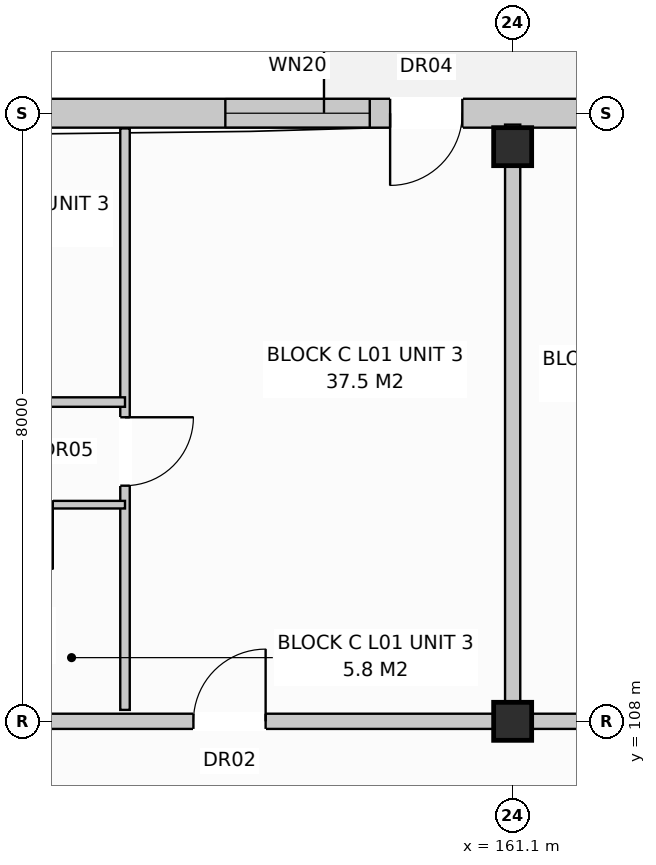
"""IFC4 building model, lengths in metres.
Left out: names, types, materials, properties, quantities, classifications, styles, units other than length and angle.
Written with IfcOpenShell. Run it as: python <this file> out.ifc"""

import sys

from ifc_helpers import new_model, si_unit, direction, frame, frame_2d, origin, origin_with_axes, origin_2d, place, context, subcontext, project, spatial, rectangle, extrude, element, fill, save


model = new_model("IFC4")
c1 = context("Model", 3, precision=1e-05, world=origin(), true_north=direction((0.0, 1.0)))
c2 = subcontext(c1, "Body", "Model", "MODEL_VIEW")
j1 = project(units=[si_unit("LENGTHUNIT", "METRE"), si_unit("PLANEANGLEUNIT", "RADIAN")], contexts=[c1])
p1 = place(None, origin())
s1 = spatial("IfcSite", under=j1, at=p1, CompositionType="ELEMENT")
p2 = place(p1, origin())
s2 = spatial("IfcBuilding", under=s1, at=p2, CompositionType="ELEMENT")
p3 = place(p2, frame((0.0, 0.0, 4.4)))
s3 = spatial("IfcBuildingStorey", under=s2, at=p3, CompositionType="ELEMENT", Elevation=4.4)
for number, where, z_axis, x_axis in (
    (1, (161.1, 108.0, 0.0), (0.0, 0.0, 1.0), (1.0, 0.0, 0.0)),
    (2, (161.1, 115.56, 0.0), (0.0, 0.0, 1.0), (1.0, 0.0, 0.0)),
):
    element("IfcColumn", number, at=place(p3, frame(where, z_axis=z_axis, x_axis=x_axis)), inside=s3, PredefinedType="COLUMN", context=c2, shape_type="SweptSolid", body=[
        extrude(rectangle(XDim=0.5, YDim=0.5, at=origin_2d()), origin(), (0.0, 0.0, 1.0), 3.6),
    ])
p4 = place(p3, frame((112.98, 116.0, 0.0), z_axis=(0.0, 0.0, 1.0), x_axis=(1.0, 0.0, 0.0)))
e3 = element("IfcWall", 3, at=p4, inside=s3, PredefinedType="STANDARD", context=c2, shape_type="SweptSolid", body=[
    extrude(rectangle(XDim=54.84, YDim=0.38, at=frame_2d((27.42, 0.0))), origin(), (0.0, 0.0, 1.0), 3.33),
])
p5 = place(p4, frame((7.39, 0.0, 0.0)))
e4 = element("IfcOpeningElement", 4, at=p5, cuts=e3, PredefinedType="OPENING", context=c2, shape_type="SweptSolid", body=[
    extrude(rectangle(XDim=0.95, YDim=2.1, at=frame_2d((0.475, 1.05))), frame((0.0, 0.202, 0.0), z_axis=(0.0, -1.0, 0.0), x_axis=(1.0, 0.0, 0.0)), (0.0, 0.0, 1.0), 0.404),
])
p6 = place(p4, frame((18.708, 0.0, 0.0)))
e5 = element("IfcOpeningElement", 5, at=p6, cuts=e3, PredefinedType="OPENING", context=c2, shape_type="SweptSolid", body=[
    extrude(rectangle(XDim=0.95, YDim=2.1, at=frame_2d((0.475, 1.05))), frame((0.0, 0.202, 0.0), z_axis=(0.0, -1.0, 0.0), x_axis=(1.0, 0.0, 0.0)), (0.0, 0.0, 1.0), 0.404),
])
p7 = place(p4, frame((32.708, 0.0, 0.0)))
e6 = element("IfcOpeningElement", 6, at=p7, cuts=e3, PredefinedType="OPENING", context=c2, shape_type="SweptSolid", body=[
    extrude(rectangle(XDim=0.95, YDim=2.1, at=frame_2d((0.475, 1.05))), frame((0.0, 0.202, 0.0), z_axis=(0.0, -1.0, 0.0), x_axis=(1.0, 0.0, 0.0)), (0.0, 0.0, 1.0), 0.404),
])
p8 = place(p4, frame((46.508, 0.0, 0.0)))
e7 = element("IfcOpeningElement", 7, at=p8, cuts=e3, PredefinedType="OPENING", context=c2, shape_type="SweptSolid", body=[
    extrude(rectangle(XDim=0.95, YDim=2.1, at=frame_2d((0.475, 1.05))), frame((0.0, 0.202, 0.0), z_axis=(0.0, -1.0, 0.0), x_axis=(1.0, 0.0, 0.0)), (0.0, 0.0, 1.0), 0.404),
])
p9 = place(p4, frame((1.515, 0.0, 0.8)))
e8 = element("IfcOpeningElement", 8, at=p9, cuts=e3, PredefinedType="OPENING", context=c2, shape_type="SweptSolid", body=[
    extrude(rectangle(XDim=1.95, YDim=1.65, at=frame_2d((0.975, 0.825))), frame((0.0, 0.202, 0.0), z_axis=(0.0, -1.0, 0.0), x_axis=(1.0, 0.0, 0.0)), (0.0, 0.0, 1.0), 0.404),
])
p10 = place(p4, frame((10.49, 0.0, 0.8)))
e9 = element("IfcOpeningElement", 9, at=p10, cuts=e3, PredefinedType="OPENING", context=c2, shape_type="SweptSolid", body=[
    extrude(rectangle(XDim=1.8, YDim=1.7, at=frame_2d((0.9, 0.85))), frame((0.0, 0.202, 0.0), z_axis=(0.0, -1.0, 0.0), x_axis=(1.0, 0.0, 0.0)), (0.0, 0.0, 1.0), 0.404),
])
p11 = place(p4, frame((15.84, 0.0, 0.8)))
e10 = element("IfcOpeningElement", 10, at=p11, cuts=e3, PredefinedType="OPENING", context=c2, shape_type="SweptSolid", body=[
    extrude(rectangle(XDim=1.9, YDim=1.85, at=frame_2d((0.95, 0.925))), frame((0.0, 0.202, 0.0), z_axis=(0.0, -1.0, 0.0), x_axis=(1.0, 0.0, 0.0)), (0.0, 0.0, 1.0), 0.404),
])
p12 = place(p4, frame((21.515, 0.0, 0.8)))
e11 = element("IfcOpeningElement", 11, at=p12, cuts=e3, PredefinedType="OPENING", context=c2, shape_type="SweptSolid", body=[
    extrude(rectangle(XDim=1.95, YDim=1.65, at=frame_2d((0.975, 0.825))), frame((0.0, 0.202, 0.0), z_axis=(0.0, -1.0, 0.0), x_axis=(1.0, 0.0, 0.0)), (0.0, 0.0, 1.0), 0.404),
])
p13 = place(p4, frame((27.99, 0.0, 0.8)))
e12 = element("IfcOpeningElement", 12, at=p13, cuts=e3, PredefinedType="OPENING", context=c2, shape_type="SweptSolid", body=[
    extrude(rectangle(XDim=1.8, YDim=1.7, at=frame_2d((0.9, 0.85))), frame((0.0, 0.202, 0.0), z_axis=(0.0, -1.0, 0.0), x_axis=(1.0, 0.0, 0.0)), (0.0, 0.0, 1.0), 0.404),
])
p14 = place(p4, frame((30.54, 0.0, 0.8)))
e13 = element("IfcOpeningElement", 13, at=p14, cuts=e3, PredefinedType="OPENING", context=c2, shape_type="SweptSolid", body=[
    extrude(rectangle(XDim=1.9, YDim=1.85, at=frame_2d((0.95, 0.925))), frame((0.0, 0.202, 0.0), z_axis=(0.0, -1.0, 0.0), x_axis=(1.0, 0.0, 0.0)), (0.0, 0.0, 1.0), 0.404),
])
p15 = place(p4, frame((35.515, 0.0, 0.8)))
e14 = element("IfcOpeningElement", 14, at=p15, cuts=e3, PredefinedType="OPENING", context=c2, shape_type="SweptSolid", body=[
    extrude(rectangle(XDim=1.95, YDim=1.65, at=frame_2d((0.975, 0.825))), frame((0.0, 0.202, 0.0), z_axis=(0.0, -1.0, 0.0), x_axis=(1.0, 0.0, 0.0)), (0.0, 0.0, 1.0), 0.404),
])
p16 = place(p4, frame((38.89, 0.0, 0.8)))
e15 = element("IfcOpeningElement", 15, at=p16, cuts=e3, PredefinedType="OPENING", context=c2, shape_type="SweptSolid", body=[
    extrude(rectangle(XDim=1.8, YDim=1.7, at=frame_2d((0.9, 0.85))), frame((0.0, 0.202, 0.0), z_axis=(0.0, -1.0, 0.0), x_axis=(1.0, 0.0, 0.0)), (0.0, 0.0, 1.0), 0.404),
])
p17 = place(p4, frame((44.34, 0.0, 0.8)))
e16 = element("IfcOpeningElement", 16, at=p17, cuts=e3, PredefinedType="OPENING", context=c2, shape_type="SweptSolid", body=[
    extrude(rectangle(XDim=1.9, YDim=1.85, at=frame_2d((0.95, 0.925))), frame((0.0, 0.202, 0.0), z_axis=(0.0, -1.0, 0.0), x_axis=(1.0, 0.0, 0.0)), (0.0, 0.0, 1.0), 0.404),
])
p18 = place(p4, frame((49.115, 0.0, 0.8)))
e17 = element("IfcOpeningElement", 17, at=p18, cuts=e3, PredefinedType="OPENING", context=c2, shape_type="SweptSolid", body=[
    extrude(rectangle(XDim=1.95, YDim=1.65, at=frame_2d((0.975, 0.825))), frame((0.0, 0.202, 0.0), z_axis=(0.0, -1.0, 0.0), x_axis=(1.0, 0.0, 0.0)), (0.0, 0.0, 1.0), 0.404),
])
p19 = place(p4, frame((52.405, 0.0, 0.8)))
e18 = element("IfcOpeningElement", 18, at=p19, cuts=e3, PredefinedType="OPENING", context=c2, shape_type="SweptSolid", body=[
    extrude(rectangle(XDim=1.8, YDim=1.7, at=frame_2d((0.9, 0.85))), frame((0.0, 0.202, 0.0), z_axis=(0.0, -1.0, 0.0), x_axis=(1.0, 0.0, 0.0)), (0.0, 0.0, 1.0), 0.404),
])
p20 = place(p3, frame((161.1, 108.15, 0.0), z_axis=(0.0, 0.0, 1.0), x_axis=(0.0, 1.0, 0.0)))
e19 = element("IfcWall", 19, at=p20, inside=s3, PredefinedType="PARTITIONING", context=c2, shape_type="SweptSolid", body=[
    extrude(rectangle(XDim=7.7, YDim=0.2, at=frame_2d((3.85, 0.0))), origin(), (0.0, 0.0, 1.0), 2.77),
])
p21 = place(p3, frame((147.3, 108.0, 0.0), z_axis=(0.0, 0.0, 1.0), x_axis=(1.0, 0.0, 0.0)))
e20 = element("IfcWall", 20, at=p21, inside=s3, PredefinedType="PARTITIONING", context=c2, shape_type="SweptSolid", body=[
    extrude(rectangle(XDim=13.8, YDim=0.2, at=frame_2d((6.9, 0.0))), origin(), (0.0, 0.0, 1.0), 2.77),
])
p22 = place(p21, frame((9.6, 0.0, 0.0)))
e21 = element("IfcOpeningElement", 21, at=p22, cuts=e20, PredefinedType="OPENING", context=c2, shape_type="SweptSolid", body=[
    extrude(rectangle(XDim=0.95, YDim=2.15, at=frame_2d((0.475, 1.075))), frame((0.0, 0.112, 0.0), z_axis=(0.0, -1.0, 0.0), x_axis=(1.0, 0.0, 0.0)), (0.0, 0.0, 1.0), 0.224),
])
p23 = place(p3, frame((156.0, 108.15, 0.0), z_axis=(0.0, 0.0, 1.0), x_axis=(0.0, 1.0, 0.0)))
e22 = element("IfcWall", 22, at=p23, inside=s3, PredefinedType="PARTITIONING", context=c2, shape_type="SweptSolid", body=[
    extrude(rectangle(XDim=7.65, YDim=0.125, at=frame_2d((3.825, 0.0))), origin(), (0.0, 0.0, 1.0), 3.33),
])
p24 = place(p23, frame((2.95, 0.0, 0.0)))
e23 = element("IfcOpeningElement", 23, at=p24, cuts=e22, PredefinedType="OPENING", context=c2, shape_type="SweptSolid", body=[
    extrude(rectangle(XDim=0.9, YDim=2.1, at=frame_2d((0.45, 1.05))), frame((0.0, 0.074, 0.0), z_axis=(0.0, -1.0, 0.0), x_axis=(1.0, 0.0, 0.0)), (0.0, 0.0, 1.0), 0.149),
])
p25 = place(p3, frame((147.4, 110.85, 0.0), z_axis=(0.0, 0.0, 1.0), x_axis=(1.0, 0.0, 0.0)))
e24 = element("IfcWall", 24, at=p25, inside=s3, PredefinedType="PARTITIONING", context=c2, shape_type="SweptSolid", body=[
    extrude(rectangle(XDim=8.6, YDim=0.1, at=frame_2d((4.3, 0.0))), origin(), (0.0, 0.0, 1.0), 3.33),
])
p26 = place(p25, frame((1.4, 0.0, 0.0)))
e25 = element("IfcOpeningElement", 25, at=p26, cuts=e24, PredefinedType="OPENING", context=c2, shape_type="SweptSolid", body=[
    extrude(rectangle(XDim=0.85, YDim=2.05, at=frame_2d((0.425, 1.025))), frame((0.0, 0.062, 0.0), z_axis=(0.0, -1.0, 0.0), x_axis=(1.0, 0.0, 0.0)), (0.0, 0.0, 1.0), 0.124),
])
p27 = place(p25, frame((4.65, 0.0, 0.0)))
e26 = element("IfcOpeningElement", 26, at=p27, cuts=e24, PredefinedType="OPENING", context=c2, shape_type="SweptSolid", body=[
    extrude(rectangle(XDim=0.85, YDim=2.05, at=frame_2d((0.425, 1.025))), frame((0.0, 0.062, 0.0), z_axis=(0.0, -1.0, 0.0), x_axis=(1.0, 0.0, 0.0)), (0.0, 0.0, 1.0), 0.124),
])
p28 = place(p25, frame((6.8, 0.0, 0.0)))
e27 = element("IfcOpeningElement", 27, at=p28, cuts=e24, PredefinedType="OPENING", context=c2, shape_type="SweptSolid", body=[
    extrude(rectangle(XDim=0.85, YDim=2.1, at=frame_2d((0.425, 1.05))), frame((0.0, 0.062, 0.0), z_axis=(0.0, -1.0, 0.0), x_axis=(1.0, 0.0, 0.0)), (0.0, 0.0, 1.0), 0.124),
])
p29 = place(p3, frame((151.5, 112.2, 0.0), z_axis=(0.0, 0.0, 1.0), x_axis=(1.0, 0.0, 0.0)))
e28 = element("IfcWall", 28, at=p29, inside=s3, PredefinedType="PARTITIONING", context=c2, shape_type="SweptSolid", body=[
    extrude(rectangle(XDim=4.5, YDim=0.125, at=frame_2d((2.25, 0.0))), origin(), (0.0, 0.0, 1.0), 3.33),
])
p30 = place(p29, frame((1.6, 0.0, 0.0)))
e29 = element("IfcOpeningElement", 29, at=p30, cuts=e28, PredefinedType="OPENING", context=c2, shape_type="SweptSolid", body=[
    extrude(rectangle(XDim=0.9, YDim=2.1, at=frame_2d((0.45, 1.05))), frame((0.0, 0.074, 0.0), z_axis=(0.0, -1.0, 0.0), x_axis=(1.0, 0.0, 0.0)), (0.0, 0.0, 1.0), 0.149),
])
p31 = place(p3, frame((161.1, 108.0, 0.0), z_axis=(0.0, 0.0, 1.0), x_axis=(1.0, 0.0, 0.0)))
e30 = element("IfcWall", 30, at=p31, inside=s3, PredefinedType="PARTITIONING", context=c2, shape_type="SweptSolid", body=[
    extrude(rectangle(XDim=6.9, YDim=0.2, at=frame_2d((3.45, 0.0))), origin(), (0.0, 0.0, 1.0), 2.77),
])
p32 = place(p31, frame((2.0, 0.0, 0.0)))
e31 = element("IfcOpeningElement", 31, at=p32, cuts=e30, PredefinedType="OPENING", context=c2, shape_type="SweptSolid", body=[
    extrude(rectangle(XDim=0.95, YDim=2.15, at=frame_2d((0.475, 1.075))), frame((0.0, 0.112, 0.0), z_axis=(0.0, -1.0, 0.0), x_axis=(1.0, 0.0, 0.0)), (0.0, 0.0, 1.0), 0.224),
])
p33 = place(p8, frame((0.95, 0.0, 0.0), z_axis=(0.0, 0.0, 1.0), x_axis=(-1.0, 0.0, 0.0)))
e32 = element("IfcDoor", 32, at=p33, inside=s3, OperationType="SINGLE_SWING_LEFT", PredefinedType="DOOR", context=c2, shape_type="SweptSolid", body=[
    extrude(rectangle(XDim=0.95, YDim=2.1, at=frame_2d((0.475, 1.05))), frame((0.0, 0.025, 0.0), z_axis=(0.0, -1.0, 0.0), x_axis=(1.0, 0.0, 0.0)), (0.0, 0.0, 1.0), 0.05),
])
fill(e7, e32)
p34 = place(p17, origin_with_axes())
e33 = element("IfcWindow", 33, at=p34, inside=s3, PartitioningType="SINGLE_PANEL", PredefinedType="WINDOW", context=c2, shape_type="SweptSolid", body=[
    extrude(rectangle(XDim=1.9, YDim=1.85, at=frame_2d((0.95, 0.925))), frame((0.0, 0.03, 0.0), z_axis=(0.0, -1.0, 0.0), x_axis=(1.0, 0.0, 0.0)), (0.0, 0.0, 1.0), 0.06),
])
fill(e16, e33)
p35 = place(p22, origin_with_axes())
e34 = element("IfcDoor", 34, at=p35, inside=s3, OperationType="SINGLE_SWING_RIGHT", PredefinedType="DOOR", context=c2, shape_type="SweptSolid", body=[
    extrude(rectangle(XDim=0.95, YDim=2.15, at=frame_2d((0.475, 1.075))), frame((0.0, 0.025, 0.0), z_axis=(0.0, -1.0, 0.0), x_axis=(1.0, 0.0, 0.0)), (0.0, 0.0, 1.0), 0.05),
])
fill(e21, e34)
p36 = place(p24, frame((0.9, 0.0, 0.0), z_axis=(0.0, 0.0, 1.0), x_axis=(-1.0, 0.0, 0.0)))
e35 = element("IfcDoor", 35, at=p36, inside=s3, OperationType="SINGLE_SWING_RIGHT", PredefinedType="DOOR", context=c2, shape_type="SweptSolid", body=[
    extrude(rectangle(XDim=0.9, YDim=2.1, at=frame_2d((0.45, 1.05))), frame((0.0, 0.025, 0.0), z_axis=(0.0, -1.0, 0.0), x_axis=(1.0, 0.0, 0.0)), (0.0, 0.0, 1.0), 0.05),
])
fill(e23, e35)
save(model, sys.argv[1])
